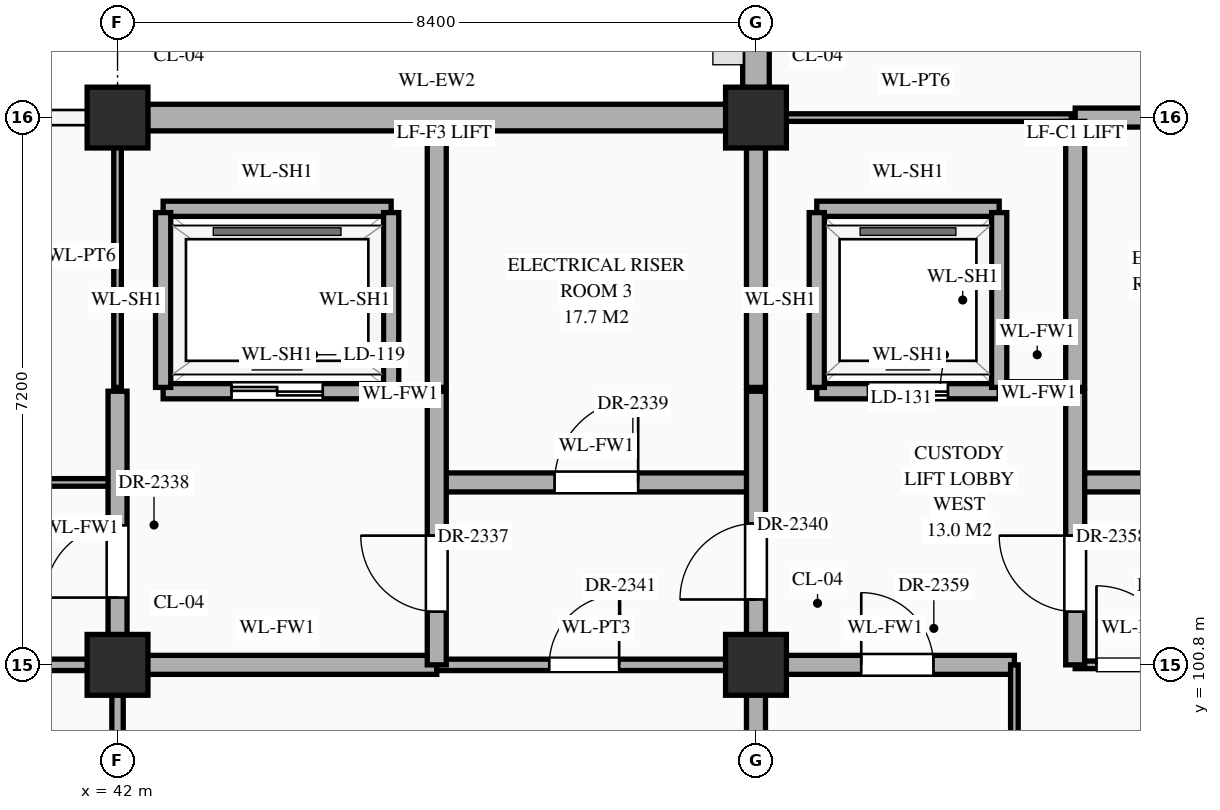
"""IFC4 building model, lengths in metres.
Left out: names, types, materials, properties, quantities, classifications, styles, units other than length and angle.
Written with IfcOpenShell. Run it as: python <this file> out.ifc"""

import sys

from ifc_helpers import new_model, si_unit, direction, frame, frame_2d, origin, origin_2d, place, context, subcontext, project, spatial, rectangle, extrude, element, fill, save


model = new_model("IFC4")
c1 = context("Model", 3, precision=1e-05, world=origin(), true_north=direction((0.0, 1.0)))
c2 = subcontext(c1, "Body", "Model", "MODEL_VIEW")
j1 = project(units=[si_unit("LENGTHUNIT", "METRE"), si_unit("PLANEANGLEUNIT", "RADIAN")], contexts=[c1])
p1 = place(None, origin())
s1 = spatial("IfcSite", under=j1, at=p1, CompositionType="ELEMENT")
p2 = place(p1, origin())
s2 = spatial("IfcBuilding", under=s1, at=p2, CompositionType="ELEMENT")
p3 = place(p2, frame((0.0, 0.0, 30.6)))
s3 = spatial("IfcBuildingStorey", under=s2, at=p3, CompositionType="ELEMENT", Elevation=30.6)
for number, where, z_axis, x_axis in (
    (1, (42.0, 100.8, 0.0), (0.0, 0.0, 1.0), (1.0, 0.0, 0.0)),
    (2, (42.0, 108.0, 0.0), (0.0, 0.0, 1.0), (1.0, 0.0, 0.0)),
    (3, (50.4, 100.8, 0.0), (0.0, 0.0, 1.0), (1.0, 0.0, 0.0)),
    (4, (50.4, 108.0, 0.0), (0.0, 0.0, 1.0), (1.0, 0.0, 0.0)),
):
    element("IfcColumn", number, at=place(p3, frame(where, z_axis=z_axis, x_axis=x_axis)), inside=s3, PredefinedType="COLUMN", context=c2, shape_type="SweptSolid", body=[
        extrude(rectangle(XDim=0.8, YDim=0.8, at=origin_2d()), origin(), (0.0, 0.0, 1.0), 4.5),
    ])
p4 = place(p3, frame((42.395, 108.0, 0.0), z_axis=(0.0, 0.0, 1.0), x_axis=(1.0, 0.0, 0.0)))
e5 = element("IfcWall", 5, at=p4, inside=s3, PredefinedType="STANDARD", context=c2, shape_type="SweptSolid", body=[
    extrude(rectangle(XDim=7.61, YDim=0.35, at=frame_2d((3.805, 0.0))), origin(), (0.0, 0.0, 1.0), 3.59),
])
p5 = place(p3, frame((50.4, 108.395, 0.0), z_axis=(0.0, 0.0, 1.0), x_axis=(0.0, 1.0, 0.0)))
e6 = element("IfcWall", 6, at=p5, inside=s3, PredefinedType="STANDARD", context=c2, shape_type="SweptSolid", body=[
    extrude(rectangle(XDim=6.41, YDim=0.35, at=frame_2d((3.205, 0.0))), origin(), (0.0, 0.0, 1.0), 3.59),
])
p6 = place(p5, frame((4.055, 0.0, 0.85)))
e7 = element("IfcOpeningElement", 7, at=p6, cuts=e6, PredefinedType="OPENING", context=c2, shape_type="SweptSolid", body=[
    extrude(rectangle(XDim=0.9, YDim=1.2, at=frame_2d((0.45, 0.6))), frame((0.0, 0.187, 0.0), z_axis=(0.0, -1.0, 0.0), x_axis=(1.0, 0.0, 0.0)), (0.0, 0.0, 1.0), 0.374),
])
p7 = place(p3, frame((31.0, 100.8, 0.0), z_axis=(0.0, 0.0, 1.0), x_axis=(1.0, 0.0, 0.0)))
e8 = element("IfcWall", 8, at=p7, inside=s3, PredefinedType="STANDARD", context=c2, shape_type="SweptSolid", body=[
    extrude(rectangle(XDim=11.0, YDim=0.15, at=frame_2d((5.5, 0.0))), origin(), (0.0, 0.0, 1.0), 3.3),
])
p8 = place(p7, frame((0.71, 0.0, 0.0)))
e9 = element("IfcOpeningElement", 9, at=p8, cuts=e8, PredefinedType="OPENING", context=c2, shape_type="SweptSolid", body=[
    extrude(rectangle(XDim=0.86, YDim=2.1, at=frame_2d((0.43, 1.05))), frame((0.0, 0.087, 0.0), z_axis=(0.0, -1.0, 0.0), x_axis=(1.0, 0.0, 0.0)), (0.0, 0.0, 1.0), 0.174),
])
p9 = place(p7, frame((6.34, 0.0, 0.0)))
e10 = element("IfcOpeningElement", 10, at=p9, cuts=e8, PredefinedType="OPENING", context=c2, shape_type="SweptSolid", body=[
    extrude(rectangle(XDim=0.92, YDim=2.15, at=frame_2d((0.46, 1.075))), frame((0.0, 0.087, 0.0), z_axis=(0.0, -1.0, 0.0), x_axis=(1.0, 0.0, 0.0)), (0.0, 0.0, 1.0), 0.174),
])
p10 = place(p3, frame((42.0, 100.8, 0.0), z_axis=(0.0, 0.0, 1.0), x_axis=(1.0, 0.0, 0.0)))
e11 = element("IfcWall", 11, at=p10, inside=s3, PredefinedType="STANDARD", context=c2, shape_type="SweptSolid", body=[
    extrude(rectangle(XDim=4.2, YDim=0.25, at=frame_2d((2.1, 0.0))), origin(), (0.0, 0.0, 1.0), 3.39),
])
p11 = place(p3, frame((46.2, 100.8, 0.0), z_axis=(0.0, 0.0, 1.0), x_axis=(1.0, 0.0, 0.0)))
e12 = element("IfcWall", 12, at=p11, inside=s3, PredefinedType="STANDARD", context=c2, shape_type="SweptSolid", body=[
    extrude(rectangle(XDim=4.2, YDim=0.15, at=frame_2d((2.1, 0.0))), origin(), (0.0, 0.0, 1.0), 3.39),
])
p12 = place(p11, frame((1.48, 0.0, 0.0)))
e13 = element("IfcOpeningElement", 13, at=p12, cuts=e12, PredefinedType="OPENING", context=c2, shape_type="SweptSolid", body=[
    extrude(rectangle(XDim=0.92, YDim=2.15, at=frame_2d((0.46, 1.075))), frame((0.0, 0.087, 0.0), z_axis=(0.0, -1.0, 0.0), x_axis=(1.0, 0.0, 0.0)), (0.0, 0.0, 1.0), 0.174),
])
p13 = place(p3, frame((50.4, 100.8, 0.0), z_axis=(0.0, 0.0, 1.0), x_axis=(1.0, 0.0, 0.0)))
e14 = element("IfcWall", 14, at=p13, inside=s3, PredefinedType="STANDARD", context=c2, shape_type="SweptSolid", body=[
    extrude(rectangle(XDim=3.4, YDim=0.25, at=frame_2d((1.7, 0.0))), origin(), (0.0, 0.0, 1.0), 3.39),
])
p14 = place(p13, frame((1.385, 0.0, 0.0)))
e15 = element("IfcOpeningElement", 15, at=p14, cuts=e14, PredefinedType="OPENING", context=c2, shape_type="SweptSolid", body=[
    extrude(rectangle(XDim=0.95, YDim=2.15, at=frame_2d((0.475, 1.075))), frame((0.0, 0.137, 0.0), z_axis=(0.0, -1.0, 0.0), x_axis=(1.0, 0.0, 0.0)), (0.0, 0.0, 1.0), 0.274),
])
p15 = place(p3, frame((54.6, 100.8, 0.0), z_axis=(0.0, 0.0, 1.0), x_axis=(1.0, 0.0, 0.0)))
e16 = element("IfcWall", 16, at=p15, inside=s3, PredefinedType="STANDARD", context=c2, shape_type="SweptSolid", body=[
    extrude(rectangle(XDim=1.6, YDim=0.1, at=frame_2d((0.8, 0.0))), origin(), (0.0, 0.0, 1.0), 3.39),
])
p16 = place(p15, frame((0.28, 0.0, 0.0)))
e17 = element("IfcOpeningElement", 17, at=p16, cuts=e16, PredefinedType="OPENING", context=c2, shape_type="SweptSolid", body=[
    extrude(rectangle(XDim=1.04, YDim=2.2, at=frame_2d((0.52, 1.1))), frame((0.0, 0.062, 0.0), z_axis=(0.0, -1.0, 0.0), x_axis=(1.0, 0.0, 0.0)), (0.0, 0.0, 1.0), 0.124),
])
p17 = place(p3, frame((25.24, 103.2, 0.0), z_axis=(0.0, 0.0, 1.0), x_axis=(1.0, 0.0, 0.0)))
e18 = element("IfcWall", 18, at=p17, inside=s3, PredefinedType="STANDARD", context=c2, shape_type="SweptSolid", body=[
    extrude(rectangle(XDim=16.76, YDim=0.1, at=frame_2d((8.38, 0.0))), origin(), (0.0, 0.0, 1.0), 4.15),
])
p18 = place(p17, frame((3.67, 0.0, 0.0)))
e19 = element("IfcOpeningElement", 19, at=p18, cuts=e18, PredefinedType="OPENING", context=c2, shape_type="SweptSolid", body=[
    extrude(rectangle(XDim=1.02, YDim=2.4, at=frame_2d((0.51, 1.2))), frame((0.0, 0.062, 0.0), z_axis=(0.0, -1.0, 0.0), x_axis=(1.0, 0.0, 0.0)), (0.0, 0.0, 1.0), 0.124),
])
p19 = place(p17, frame((12.03, 0.0, 0.0)))
e20 = element("IfcOpeningElement", 20, at=p19, cuts=e18, PredefinedType="OPENING", context=c2, shape_type="SweptSolid", body=[
    extrude(rectangle(XDim=1.06, YDim=2.4, at=frame_2d((0.53, 1.2))), frame((0.0, 0.062, 0.0), z_axis=(0.0, -1.0, 0.0), x_axis=(1.0, 0.0, 0.0)), (0.0, 0.0, 1.0), 0.124),
])
p20 = place(p3, frame((46.2, 103.2, 0.0), z_axis=(0.0, 0.0, 1.0), x_axis=(1.0, 0.0, 0.0)))
e21 = element("IfcWall", 21, at=p20, inside=s3, PredefinedType="STANDARD", context=c2, shape_type="SweptSolid", body=[
    extrude(rectangle(XDim=4.2, YDim=0.25, at=frame_2d((2.1, 0.0))), origin(), (0.0, 0.0, 1.0), 4.24),
])
p21 = place(p20, frame((1.55, 0.0, 0.0)))
e22 = element("IfcOpeningElement", 22, at=p21, cuts=e21, PredefinedType="OPENING", context=c2, shape_type="SweptSolid", body=[
    extrude(rectangle(XDim=1.1, YDim=2.2, at=frame_2d((0.55, 1.1))), frame((0.0, 0.137, 0.0), z_axis=(0.0, -1.0, 0.0), x_axis=(1.0, 0.0, 0.0)), (0.0, 0.0, 1.0), 0.274),
])
p22 = place(p3, frame((54.6, 103.2, 0.0), z_axis=(0.0, 0.0, 1.0), x_axis=(1.0, 0.0, 0.0)))
e23 = element("IfcWall", 23, at=p22, inside=s3, PredefinedType="STANDARD", context=c2, shape_type="SweptSolid", body=[
    extrude(rectangle(XDim=4.2, YDim=0.25, at=frame_2d((2.1, 0.0))), origin(), (0.0, 0.0, 1.0), 4.24),
])
p23 = place(p22, frame((1.55, 0.0, 0.0)))
e24 = element("IfcOpeningElement", 24, at=p23, cuts=e23, PredefinedType="OPENING", context=c2, shape_type="SweptSolid", body=[
    extrude(rectangle(XDim=1.1, YDim=2.2, at=frame_2d((0.55, 1.1))), frame((0.0, 0.137, 0.0), z_axis=(0.0, -1.0, 0.0), x_axis=(1.0, 0.0, 0.0)), (0.0, 0.0, 1.0), 0.274),
])
p24 = place(p3, frame((42.6, 104.4, 0.0), z_axis=(0.0, 0.0, 1.0), x_axis=(1.0, 0.0, 0.0)))
e25 = element("IfcWall", 25, at=p24, inside=s3, PredefinedType="STANDARD", context=c2, shape_type="SweptSolid", body=[
    extrude(rectangle(XDim=3.0, YDim=0.2, at=frame_2d((1.5, 0.0))), origin(), (0.0, 0.0, 1.0), 4.24),
])
p25 = place(p24, frame((0.9, 0.0, 0.0)))
e26 = element("IfcOpeningElement", 26, at=p25, cuts=e25, PredefinedType="OPENING", context=c2, shape_type="SweptSolid", body=[
    extrude(rectangle(XDim=1.2, YDim=2.15, at=frame_2d((0.6, 1.075))), frame((0.0, 0.112, 0.0), z_axis=(0.0, -1.0, 0.0), x_axis=(1.0, 0.0, 0.0)), (0.0, 0.0, 1.0), 0.224),
])
p26 = place(p3, frame((51.2, 104.4, 0.0), z_axis=(0.0, 0.0, 1.0), x_axis=(1.0, 0.0, 0.0)))
e27 = element("IfcWall", 27, at=p26, inside=s3, PredefinedType="STANDARD", context=c2, shape_type="SweptSolid", body=[
    extrude(rectangle(XDim=2.4, YDim=0.2, at=frame_2d((1.2, 0.0))), origin(), (0.0, 0.0, 1.0), 4.24),
])
p27 = place(p26, frame((0.675, 0.0, 0.0)))
e28 = element("IfcOpeningElement", 28, at=p27, cuts=e27, PredefinedType="OPENING", context=c2, shape_type="SweptSolid", body=[
    extrude(rectangle(XDim=1.05, YDim=2.15, at=frame_2d((0.525, 1.075))), frame((0.0, 0.112, 0.0), z_axis=(0.0, -1.0, 0.0), x_axis=(1.0, 0.0, 0.0)), (0.0, 0.0, 1.0), 0.224),
])
p28 = place(p3, frame((53.65, 104.4, 0.0), z_axis=(0.0, 0.0, 1.0), x_axis=(1.0, 0.0, 0.0)))
e29 = element("IfcWall", 29, at=p28, inside=s3, PredefinedType="STANDARD", context=c2, shape_type="SweptSolid", body=[
    extrude(rectangle(XDim=0.9, YDim=0.25, at=frame_2d((0.45, 0.0))), origin(), (0.0, 0.0, 1.0), 4.24),
])
p29 = place(p3, frame((42.6, 106.8, 0.0), z_axis=(0.0, 0.0, 1.0), x_axis=(1.0, 0.0, 0.0)))
e30 = element("IfcWall", 30, at=p29, inside=s3, PredefinedType="STANDARD", context=c2, shape_type="SweptSolid", body=[
    extrude(rectangle(XDim=3.0, YDim=0.2, at=frame_2d((1.5, 0.0))), origin(), (0.0, 0.0, 1.0), 4.24),
])
p30 = place(p3, frame((51.2, 106.8, 0.0), z_axis=(0.0, 0.0, 1.0), x_axis=(1.0, 0.0, 0.0)))
e31 = element("IfcWall", 31, at=p30, inside=s3, PredefinedType="STANDARD", context=c2, shape_type="SweptSolid", body=[
    extrude(rectangle(XDim=2.4, YDim=0.2, at=frame_2d((1.2, 0.0))), origin(), (0.0, 0.0, 1.0), 4.24),
])
p31 = place(p3, frame((50.45, 108.0, 0.0), z_axis=(0.0, 0.0, 1.0), x_axis=(1.0, 0.0, 0.0)))
e32 = element("IfcWall", 32, at=p31, inside=s3, PredefinedType="STANDARD", context=c2, shape_type="SweptSolid", body=[
    extrude(rectangle(XDim=4.1, YDim=0.1, at=frame_2d((2.05, 0.0))), origin(), (0.0, 0.0, 1.0), 3.39),
])
p32 = place(p3, frame((54.6, 108.0, 0.0), z_axis=(0.0, 0.0, 1.0), x_axis=(1.0, 0.0, 0.0)))
e33 = element("IfcWall", 33, at=p32, inside=s3, PredefinedType="STANDARD", context=c2, shape_type="SweptSolid", body=[
    extrude(rectangle(XDim=4.2, YDim=0.25, at=frame_2d((2.1, 0.0))), origin(), (0.0, 0.0, 1.0), 3.39),
])
p33 = place(p32, frame((1.39, 0.0, 0.0)))
e34 = element("IfcOpeningElement", 34, at=p33, cuts=e33, PredefinedType="OPENING", context=c2, shape_type="SweptSolid", body=[
    extrude(rectangle(XDim=1.1, YDim=2.2, at=frame_2d((0.55, 1.1))), frame((0.0, 0.137, 0.0), z_axis=(0.0, -1.0, 0.0), x_axis=(1.0, 0.0, 0.0)), (0.0, 0.0, 1.0), 0.274),
])
p34 = place(p3, frame((42.0, 96.0, 0.0), z_axis=(0.0, 0.0, 1.0), x_axis=(0.0, 1.0, 0.0)))
e35 = element("IfcWall", 35, at=p34, inside=s3, PredefinedType="STANDARD", context=c2, shape_type="SweptSolid", body=[
    extrude(rectangle(XDim=4.8, YDim=0.15, at=frame_2d((2.4, 0.0))), origin(), (0.0, 0.0, 1.0), 3.4),
])
p35 = place(p3, frame((42.0, 100.8, 0.0), z_axis=(0.0, 0.0, 1.0), x_axis=(0.0, 1.0, 0.0)))
e36 = element("IfcWall", 36, at=p35, inside=s3, PredefinedType="STANDARD", context=c2, shape_type="SweptSolid", body=[
    extrude(rectangle(XDim=3.6, YDim=0.25, at=frame_2d((1.8, 0.0))), origin(), (0.0, 0.0, 1.0), 3.4),
])
p36 = place(p35, frame((0.885, 0.0, 0.0)))
e37 = element("IfcOpeningElement", 37, at=p36, cuts=e36, PredefinedType="OPENING", context=c2, shape_type="SweptSolid", body=[
    extrude(rectangle(XDim=0.95, YDim=2.15, at=frame_2d((0.475, 1.075))), frame((0.0, 0.137, 0.0), z_axis=(0.0, -1.0, 0.0), x_axis=(1.0, 0.0, 0.0)), (0.0, 0.0, 1.0), 0.274),
])
p37 = place(p3, frame((42.0, 104.45, 0.0), z_axis=(0.0, 0.0, 1.0), x_axis=(0.0, 1.0, 0.0)))
e38 = element("IfcWall", 38, at=p37, inside=s3, PredefinedType="STANDARD", context=c2, shape_type="SweptSolid", body=[
    extrude(rectangle(XDim=3.46, YDim=0.1, at=frame_2d((1.73, 0.0))), origin(), (0.0, 0.0, 1.0), 3.4),
])
for number, where, z_axis, x_axis in (
    (39, (42.6, 104.45, 0.0), (0.0, 0.0, 1.0), (0.0, 1.0, 0.0)),
    (40, (45.6, 104.45, 0.0), (0.0, 0.0, 1.0), (0.0, 1.0, 0.0)),
):
    element("IfcWall", number, at=place(p3, frame(where, z_axis=z_axis, x_axis=x_axis)), inside=s3, PredefinedType="STANDARD", context=c2, shape_type="SweptSolid", body=[
        extrude(rectangle(XDim=2.3, YDim=0.2, at=frame_2d((1.15, 0.0))), origin(), (0.0, 0.0, 1.0), 4.24),
    ])
p38 = place(p3, frame((46.2, 100.8, 0.0), z_axis=(0.0, 0.0, 1.0), x_axis=(0.0, 1.0, 0.0)))
e41 = element("IfcWall", 41, at=p38, inside=s3, PredefinedType="STANDARD", context=c2, shape_type="SweptSolid", body=[
    extrude(rectangle(XDim=3.6, YDim=0.25, at=frame_2d((1.8, 0.0))), origin(), (0.0, 0.0, 1.0), 3.89),
])
p39 = place(p38, frame((0.7, 0.0, 0.0)))
e42 = element("IfcOpeningElement", 42, at=p39, cuts=e41, PredefinedType="OPENING", context=c2, shape_type="SweptSolid", body=[
    extrude(rectangle(XDim=1.0, YDim=2.2, at=frame_2d((0.5, 1.1))), frame((0.0, 0.137, 0.0), z_axis=(0.0, -1.0, 0.0), x_axis=(1.0, 0.0, 0.0)), (0.0, 0.0, 1.0), 0.274),
])
p40 = place(p3, frame((46.2, 104.45, 0.0), z_axis=(0.0, 0.0, 1.0), x_axis=(0.0, 1.0, 0.0)))
e43 = element("IfcWall", 43, at=p40, inside=s3, PredefinedType="STANDARD", context=c2, shape_type="SweptSolid", body=[
    extrude(rectangle(XDim=3.46, YDim=0.25, at=frame_2d((1.73, 0.0))), origin(), (0.0, 0.0, 1.0), 3.89),
])
p41 = place(p3, frame((50.4, 91.2, 0.0), z_axis=(0.0, 0.0, 1.0), x_axis=(0.0, 1.0, 0.0)))
e44 = element("IfcWall", 44, at=p41, inside=s3, PredefinedType="STANDARD", context=c2, shape_type="SweptSolid", body=[
    extrude(rectangle(XDim=13.2, YDim=0.25, at=frame_2d((6.6, 0.0))), origin(), (0.0, 0.0, 1.0), 3.49),
])
p42 = place(p41, frame((0.565, 0.0, 0.0)))
e45 = element("IfcOpeningElement", 45, at=p42, cuts=e44, PredefinedType="OPENING", context=c2, shape_type="SweptSolid", body=[
    extrude(rectangle(XDim=0.95, YDim=2.15, at=frame_2d((0.475, 1.075))), frame((0.0, 0.137, 0.0), z_axis=(0.0, -1.0, 0.0), x_axis=(1.0, 0.0, 0.0)), (0.0, 0.0, 1.0), 0.274),
])
p43 = place(p41, frame((10.46, 0.0, 0.0)))
e46 = element("IfcOpeningElement", 46, at=p43, cuts=e44, PredefinedType="OPENING", context=c2, shape_type="SweptSolid", body=[
    extrude(rectangle(XDim=1.0, YDim=2.2, at=frame_2d((0.5, 1.1))), frame((0.0, 0.137, 0.0), z_axis=(0.0, -1.0, 0.0), x_axis=(1.0, 0.0, 0.0)), (0.0, 0.0, 1.0), 0.274),
])
p44 = place(p41, frame((3.21, 0.0, 0.0)))
e47 = element("IfcOpeningElement", 47, at=p44, cuts=e44, PredefinedType="OPENING", context=c2, shape_type="SweptSolid", body=[
    extrude(rectangle(XDim=1.1, YDim=2.2, at=frame_2d((0.55, 1.1))), frame((0.0, 0.137, 0.0), z_axis=(0.0, -1.0, 0.0), x_axis=(1.0, 0.0, 0.0)), (0.0, 0.0, 1.0), 0.274),
])
p45 = place(p3, frame((50.4, 104.45, 0.0), z_axis=(0.0, 0.0, 1.0), x_axis=(0.0, 1.0, 0.0)))
e48 = element("IfcWall", 48, at=p45, inside=s3, PredefinedType="STANDARD", context=c2, shape_type="SweptSolid", body=[
    extrude(rectangle(XDim=3.46, YDim=0.25, at=frame_2d((1.73, 0.0))), origin(), (0.0, 0.0, 1.0), 3.49),
])
for number, where, z_axis, x_axis in (
    (49, (51.2, 104.45, 0.0), (0.0, 0.0, 1.0), (0.0, 1.0, 0.0)),
    (50, (53.6, 104.45, 0.0), (0.0, 0.0, 1.0), (0.0, 1.0, 0.0)),
):
    element("IfcWall", number, at=place(p3, frame(where, z_axis=z_axis, x_axis=x_axis)), inside=s3, PredefinedType="STANDARD", context=c2, shape_type="SweptSolid", body=[
        extrude(rectangle(XDim=2.3, YDim=0.2, at=frame_2d((1.15, 0.0))), origin(), (0.0, 0.0, 1.0), 4.24),
    ])
p46 = place(p3, frame((53.8, 96.0, 0.0), z_axis=(0.0, 0.0, 1.0), x_axis=(0.0, 1.0, 0.0)))
e51 = element("IfcWall", 51, at=p46, inside=s3, PredefinedType="STANDARD", context=c2, shape_type="SweptSolid", body=[
    extrude(rectangle(XDim=4.8, YDim=0.1, at=frame_2d((2.4, 0.0))), origin(), (0.0, 0.0, 1.0), 4.24),
])
p47 = place(p46, frame((1.8, 0.0, 0.0)))
e52 = element("IfcOpeningElement", 52, at=p47, cuts=e51, PredefinedType="OPENING", context=c2, shape_type="SweptSolid", body=[
    extrude(rectangle(XDim=1.2, YDim=2.35, at=frame_2d((0.6, 1.175))), frame((0.0, 0.062, 0.0), z_axis=(0.0, -1.0, 0.0), x_axis=(1.0, 0.0, 0.0)), (0.0, 0.0, 1.0), 0.124),
])
p48 = place(p3, frame((54.6, 100.8, 0.0), z_axis=(0.0, 0.0, 1.0), x_axis=(0.0, 1.0, 0.0)))
e53 = element("IfcWall", 53, at=p48, inside=s3, PredefinedType="STANDARD", context=c2, shape_type="SweptSolid", body=[
    extrude(rectangle(XDim=3.6, YDim=0.25, at=frame_2d((1.8, 0.0))), origin(), (0.0, 0.0, 1.0), 3.94),
])
p49 = place(p48, frame((0.7, 0.0, 0.0)))
e54 = element("IfcOpeningElement", 54, at=p49, cuts=e53, PredefinedType="OPENING", context=c2, shape_type="SweptSolid", body=[
    extrude(rectangle(XDim=1.0, YDim=2.2, at=frame_2d((0.5, 1.1))), frame((0.0, 0.137, 0.0), z_axis=(0.0, -1.0, 0.0), x_axis=(1.0, 0.0, 0.0)), (0.0, 0.0, 1.0), 0.274),
])
p50 = place(p3, frame((54.6, 104.45, 0.0), z_axis=(0.0, 0.0, 1.0), x_axis=(0.0, 1.0, 0.0)))
e55 = element("IfcWall", 55, at=p50, inside=s3, PredefinedType="STANDARD", context=c2, shape_type="SweptSolid", body=[
    extrude(rectangle(XDim=3.5, YDim=0.25, at=frame_2d((1.75, 0.0))), origin(), (0.0, 0.0, 1.0), 3.94),
])
p51 = place(p25, origin())
e56 = element("IfcDoor", 56, at=p51, inside=s3, OperationType="DOUBLE_DOOR_SLIDING", PredefinedType="DOOR", context=c2, shape_type="SweptSolid", body=[
    extrude(rectangle(XDim=1.2, YDim=2.15, at=frame_2d((0.6, 1.075))), frame((0.0, 0.025, 0.0), z_axis=(0.0, -1.0, 0.0), x_axis=(1.0, 0.0, 0.0)), (0.0, 0.0, 1.0), 0.05),
])
fill(e26, e56)
p52 = place(p27, origin())
e57 = element("IfcDoor", 57, at=p52, inside=s3, OperationType="DOUBLE_DOOR_SLIDING", PredefinedType="DOOR", context=c2, shape_type="SweptSolid", body=[
    extrude(rectangle(XDim=1.05, YDim=2.15, at=frame_2d((0.525, 1.075))), frame((0.0, 0.025, 0.0), z_axis=(0.0, -1.0, 0.0), x_axis=(1.0, 0.0, 0.0)), (0.0, 0.0, 1.0), 0.05),
])
fill(e28, e57)
p53 = place(p39, origin())
e58 = element("IfcDoor", 58, at=p53, inside=s3, OperationType="SINGLE_SWING_RIGHT", PredefinedType="DOOR", context=c2, shape_type="SweptSolid", body=[
    extrude(rectangle(XDim=1.0, YDim=2.2, at=frame_2d((0.5, 1.1))), frame((0.0, 0.025, 0.0), z_axis=(0.0, -1.0, 0.0), x_axis=(1.0, 0.0, 0.0)), (0.0, 0.0, 1.0), 0.05),
])
fill(e42, e58)
p54 = place(p36, origin())
e59 = element("IfcDoor", 59, at=p54, inside=s3, OperationType="SINGLE_SWING_LEFT", PredefinedType="DOOR", context=c2, shape_type="SweptSolid", body=[
    extrude(rectangle(XDim=0.95, YDim=2.15, at=frame_2d((0.475, 1.075))), frame((0.0, 0.025, 0.0), z_axis=(0.0, -1.0, 0.0), x_axis=(1.0, 0.0, 0.0)), (0.0, 0.0, 1.0), 0.05),
])
fill(e37, e59)
p55 = place(p21, origin())
e60 = element("IfcDoor", 60, at=p55, inside=s3, OperationType="SINGLE_SWING_RIGHT", PredefinedType="DOOR", context=c2, shape_type="SweptSolid", body=[
    extrude(rectangle(XDim=1.1, YDim=2.2, at=frame_2d((0.55, 1.1))), frame((0.0, 0.025, 0.0), z_axis=(0.0, -1.0, 0.0), x_axis=(1.0, 0.0, 0.0)), (0.0, 0.0, 1.0), 0.05),
])
fill(e22, e60)
p56 = place(p43, origin())
e61 = element("IfcDoor", 61, at=p56, inside=s3, OperationType="SINGLE_SWING_LEFT", PredefinedType="DOOR", context=c2, shape_type="SweptSolid", body=[
    extrude(rectangle(XDim=1.0, YDim=2.2, at=frame_2d((0.5, 1.1))), frame((0.0, 0.025, 0.0), z_axis=(0.0, -1.0, 0.0), x_axis=(1.0, 0.0, 0.0)), (0.0, 0.0, 1.0), 0.05),
])
fill(e46, e61)
p57 = place(p12, origin())
e62 = element("IfcDoor", 62, at=p57, inside=s3, OperationType="SINGLE_SWING_RIGHT", PredefinedType="DOOR", context=c2, shape_type="SweptSolid", body=[
    extrude(rectangle(XDim=0.92, YDim=2.15, at=frame_2d((0.46, 1.075))), frame((0.0, 0.025, 0.0), z_axis=(0.0, -1.0, 0.0), x_axis=(1.0, 0.0, 0.0)), (0.0, 0.0, 1.0), 0.05),
])
fill(e13, e62)
p58 = place(p49, origin())
e63 = element("IfcDoor", 63, at=p58, inside=s3, OperationType="SINGLE_SWING_RIGHT", PredefinedType="DOOR", context=c2, shape_type="SweptSolid", body=[
    extrude(rectangle(XDim=1.0, YDim=2.2, at=frame_2d((0.5, 1.1))), frame((0.0, 0.025, 0.0), z_axis=(0.0, -1.0, 0.0), x_axis=(1.0, 0.0, 0.0)), (0.0, 0.0, 1.0), 0.05),
])
fill(e54, e63)
p59 = place(p14, origin())
e64 = element("IfcDoor", 64, at=p59, inside=s3, OperationType="SINGLE_SWING_LEFT", PredefinedType="DOOR", context=c2, shape_type="SweptSolid", body=[
    extrude(rectangle(XDim=0.95, YDim=2.15, at=frame_2d((0.475, 1.075))), frame((0.0, 0.025, 0.0), z_axis=(0.0, -1.0, 0.0), x_axis=(1.0, 0.0, 0.0)), (0.0, 0.0, 1.0), 0.05),
])
fill(e15, e64)
p60 = place(p16, origin())
e65 = element("IfcDoor", 65, at=p60, inside=s3, OperationType="SINGLE_SWING_LEFT", PredefinedType="DOOR", context=c2, shape_type="SweptSolid", body=[
    extrude(rectangle(XDim=1.04, YDim=2.2, at=frame_2d((0.52, 1.1))), frame((0.0, 0.025, 0.0), z_axis=(0.0, -1.0, 0.0), x_axis=(1.0, 0.0, 0.0)), (0.0, 0.0, 1.0), 0.05),
])
fill(e17, e65)
save(model, sys.argv[1])
